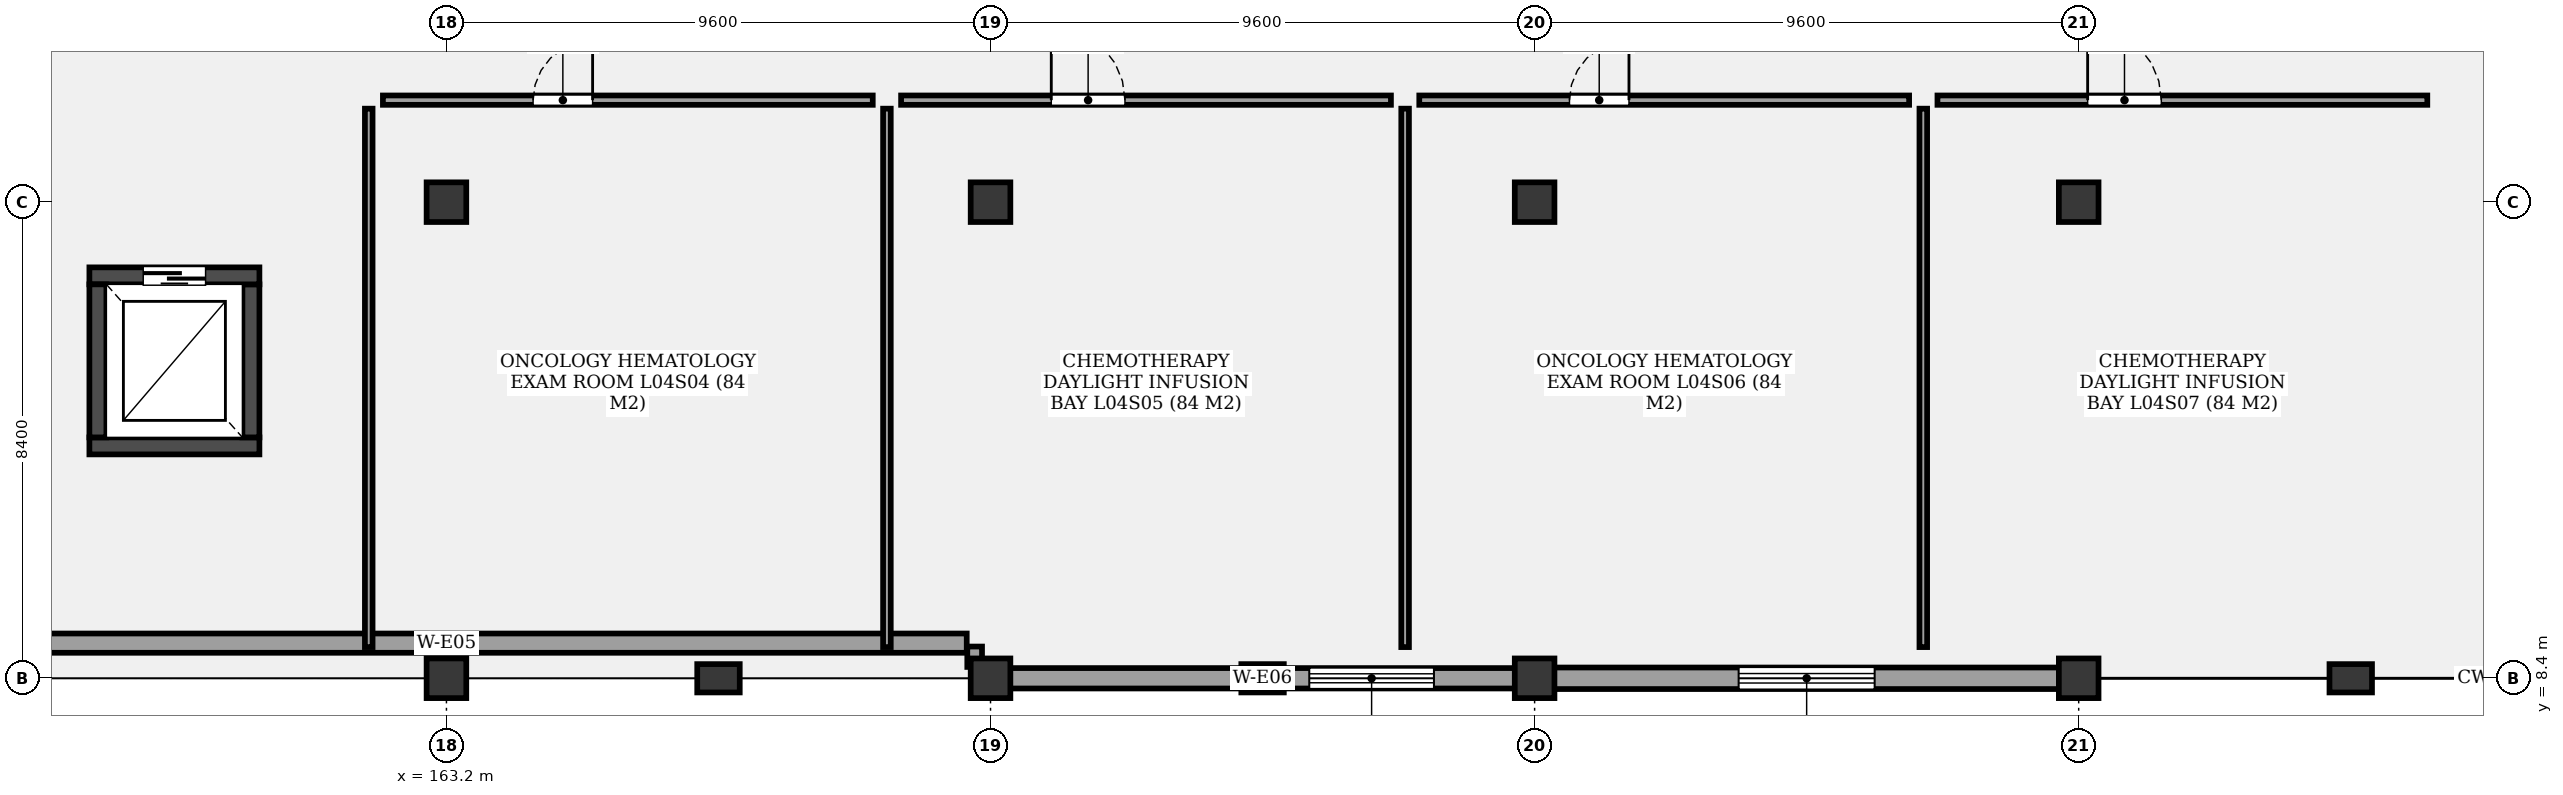
"""IFC4 building model, lengths in metres.
Left out: names, types, materials, properties, quantities, classifications, styles, units other than length and angle.
Written with IfcOpenShell. Run it as: python <this file> out.ifc"""

import sys

from ifc_helpers import new_model, si_unit, direction, frame, frame_2d, origin, origin_2d, place, context, subcontext, project, spatial, rectangle, extrude, element, fill, save


model = new_model("IFC4")
c1 = context("Model", 3, precision=1e-05, world=origin(), true_north=direction((0.0, 1.0)))
c2 = subcontext(c1, "Body", "Model", "MODEL_VIEW")
j1 = project(units=[si_unit("LENGTHUNIT", "METRE"), si_unit("PLANEANGLEUNIT", "RADIAN")], contexts=[c1])
p1 = place(None, origin())
s1 = spatial("IfcSite", under=j1, at=p1, CompositionType="ELEMENT")
p2 = place(p1, origin())
s2 = spatial("IfcBuilding", under=s1, at=p2, CompositionType="ELEMENT")
p3 = place(p2, frame((0.0, 0.0, 17.8)))
s3 = spatial("IfcBuildingStorey", under=s2, at=p3, CompositionType="ELEMENT", Elevation=17.8)
for number, where, z_axis, x_axis in (
    (1, (163.2, 8.4, 0.0), (0.0, 0.0, 1.0), (1.0, 0.0, 0.0)),
    (2, (163.2, 16.8, 0.0), (0.0, 0.0, 1.0), (1.0, 0.0, 0.0)),
    (3, (172.8, 8.4, 0.0), (0.0, 0.0, 1.0), (1.0, 0.0, 0.0)),
    (4, (172.8, 16.8, 0.0), (0.0, 0.0, 1.0), (1.0, 0.0, 0.0)),
    (5, (182.4, 8.4, 0.0), (0.0, 0.0, 1.0), (1.0, 0.0, 0.0)),
    (6, (182.4, 16.8, 0.0), (0.0, 0.0, 1.0), (1.0, 0.0, 0.0)),
    (7, (192.0, 8.4, 0.0), (0.0, 0.0, 1.0), (1.0, 0.0, 0.0)),
    (8, (192.0, 16.8, 0.0), (0.0, 0.0, 1.0), (1.0, 0.0, 0.0)),
):
    element("IfcColumn", number, at=place(p3, frame(where, z_axis=z_axis, x_axis=x_axis)), inside=s3, PredefinedType="COLUMN", context=c2, shape_type="SweptSolid", body=[
        extrude(rectangle(XDim=0.7, YDim=0.7, at=origin_2d()), origin(), (0.0, 0.0, 1.0), 4.2),
    ])
for number, where, z_axis, x_axis in (
    (9, (168.0, 8.4, 0.0), (0.0, 0.0, 1.0), (1.0, 0.0, 0.0)),
    (10, (177.6, 8.4, 0.0), (0.0, 0.0, 1.0), (1.0, 0.0, 0.0)),
    (11, (196.8, 8.4, 0.0), (0.0, 0.0, 1.0), (1.0, 0.0, 0.0)),
):
    element("IfcColumn", number, at=place(p3, frame(where, z_axis=z_axis, x_axis=x_axis)), inside=s3, PredefinedType="PILASTER", context=c2, shape_type="SweptSolid", body=[
        extrude(rectangle(XDim=0.75, YDim=0.5, at=origin_2d()), origin(), (0.0, 0.0, 1.0), 4.2),
    ])
p4 = place(p3, frame((156.9, 12.5, 0.0), z_axis=(0.0, 0.0, 1.0), x_axis=(1.0, 0.0, 0.0)))
e12 = element("IfcWall", 12, at=p4, inside=s3, PredefinedType="SHEAR", context=c2, shape_type="SweptSolid", body=[
    extrude(rectangle(XDim=3.0, YDim=0.3, at=frame_2d((1.5, 0.0))), origin(), (0.0, 0.0, 1.0), 4.2),
])
p5 = place(p3, frame((159.75, 12.65, 0.0), z_axis=(0.0, 0.0, 1.0), x_axis=(0.0, 1.0, 0.0)))
e13 = element("IfcWall", 13, at=p5, inside=s3, PredefinedType="SHEAR", context=c2, shape_type="SweptSolid", body=[
    extrude(rectangle(XDim=2.7, YDim=0.3, at=frame_2d((1.35, 0.0))), origin(), (0.0, 0.0, 1.0), 4.2),
])
p6 = place(p3, frame((159.9, 15.5, 0.0), z_axis=(0.0, 0.0, 1.0), x_axis=(-1.0, 0.0, 0.0)))
e14 = element("IfcWall", 14, at=p6, inside=s3, PredefinedType="SHEAR", context=c2, shape_type="SweptSolid", body=[
    extrude(rectangle(XDim=3.0, YDim=0.3, at=frame_2d((1.5, 0.0))), origin(), (0.0, 0.0, 1.0), 4.2),
])
p7 = place(p6, frame((0.95, 0.0, 0.0)))
e15 = element("IfcOpeningElement", 15, at=p7, cuts=e14, PredefinedType="OPENING", context=c2, shape_type="SweptSolid", body=[
    extrude(rectangle(XDim=1.1, YDim=2.2, at=frame_2d((0.55, 1.1))), frame((0.0, 0.16, 0.0), z_axis=(0.0, -1.0, 0.0), x_axis=(1.0, 0.0, 0.0)), (0.0, 0.0, 1.0), 0.32),
])
p8 = place(p3, frame((157.05, 15.35, 0.0), z_axis=(0.0, 0.0, 1.0), x_axis=(0.0, -1.0, 0.0)))
e16 = element("IfcWall", 16, at=p8, inside=s3, PredefinedType="SHEAR", context=c2, shape_type="SweptSolid", body=[
    extrude(rectangle(XDim=2.7, YDim=0.3, at=frame_2d((1.35, 0.0))), origin(), (0.0, 0.0, 1.0), 4.2),
])
p9 = place(p3, frame((172.52, 8.6, 0.0), z_axis=(0.0, 0.0, 1.0), x_axis=(0.0, 1.0, 0.0)))
e17 = element("IfcWall", 17, at=p9, inside=s3, PredefinedType="SOLIDWALL", context=c2, shape_type="SweptSolid", body=[
    extrude(rectangle(XDim=0.36, YDim=0.26, at=frame_2d((0.18, 0.0))), origin(), (0.0, 0.0, 1.0), 3.39),
])
p10 = place(p3, frame((172.38, 9.02, 0.0), z_axis=(0.0, 0.0, 1.0), x_axis=(-1.0, 0.0, 0.0)))
e18 = element("IfcWall", 18, at=p10, inside=s3, PredefinedType="SOLIDWALL", context=c2, shape_type="SweptSolid", body=[
    extrude(rectangle(XDim=18.36, YDim=0.34, at=frame_2d((9.18, 0.0))), origin(), (0.0, 0.0, 1.0), 3.39),
])
p11 = place(p3, frame((182.4, 8.4, 0.0), z_axis=(0.0, 0.0, 1.0), x_axis=(-1.0, 0.0, 0.0)))
e19 = element("IfcWall", 19, at=p11, inside=s3, PredefinedType="SOLIDWALL", context=c2, shape_type="SweptSolid", body=[
    extrude(rectangle(XDim=9.6, YDim=0.36, at=frame_2d((4.8, 0.0))), origin(), (0.0, 0.0, 1.0), 3.39),
])
p12 = place(p11, frame((1.776, 0.0, 0.85)))
e20 = element("IfcOpeningElement", 20, at=p12, cuts=e19, PredefinedType="OPENING", context=c2, shape_type="SweptSolid", body=[
    extrude(rectangle(XDim=2.2, YDim=1.4, at=frame_2d((1.1, 0.7))), frame((0.0, 0.19, 0.0), z_axis=(0.0, -1.0, 0.0), x_axis=(1.0, 0.0, 0.0)), (0.0, 0.0, 1.0), 0.38),
])
p13 = place(p3, frame((192.0, 8.4, 0.0), z_axis=(0.0, 0.0, 1.0), x_axis=(-1.0, 0.0, 0.0)))
e21 = element("IfcWall", 21, at=p13, inside=s3, PredefinedType="SOLIDWALL", context=c2, shape_type="SweptSolid", body=[
    extrude(rectangle(XDim=9.6, YDim=0.38, at=frame_2d((4.8, 0.0))), origin(), (0.0, 0.0, 1.0), 3.39),
])
p14 = place(p13, frame((3.6, 0.0, 0.85)))
e22 = element("IfcOpeningElement", 22, at=p14, cuts=e21, PredefinedType="OPENING", context=c2, shape_type="SweptSolid", body=[
    extrude(rectangle(XDim=2.4, YDim=1.4, at=frame_2d((1.2, 0.7))), frame((0.0, 0.2, 0.0), z_axis=(0.0, -1.0, 0.0), x_axis=(1.0, 0.0, 0.0)), (0.0, 0.0, 1.0), 0.4),
])
p15 = place(p3, frame((162.079, 18.6, 0.0), z_axis=(0.0, 0.0, 1.0), x_axis=(1.0, 0.0, 0.0)))
e23 = element("IfcWall", 23, at=p15, inside=s3, PredefinedType="PARTITIONING", context=c2, shape_type="SweptSolid", body=[
    extrude(rectangle(XDim=8.643, YDim=0.165, at=frame_2d((4.321, 0.0))), origin(), (0.0, 0.0, 1.0), 3.3),
])
p16 = place(p15, frame((2.65, 0.0, 0.0)))
e24 = element("IfcOpeningElement", 24, at=p16, cuts=e23, PredefinedType="OPENING", context=c2, shape_type="SweptSolid", body=[
    extrude(rectangle(XDim=1.05, YDim=2.1, at=frame_2d((0.525, 1.05))), frame((0.0, 0.093, 0.0), z_axis=(0.0, -1.0, 0.0), x_axis=(1.0, 0.0, 0.0)), (0.0, 0.0, 1.0), 0.185),
])
p17 = place(p3, frame((161.829, 8.95, 0.0), z_axis=(0.0, 0.0, 1.0), x_axis=(0.0, 1.0, 0.0)))
e25 = element("IfcWall", 25, at=p17, inside=s3, PredefinedType="PARTITIONING", context=c2, shape_type="SweptSolid", body=[
    extrude(rectangle(XDim=9.5, YDim=0.135, at=frame_2d((4.75, 0.0))), origin(), (0.0, 0.0, 1.0), 3.3),
])
p18 = place(p3, frame((171.222, 18.6, 0.0), z_axis=(0.0, 0.0, 1.0), x_axis=(1.0, 0.0, 0.0)))
e26 = element("IfcWall", 26, at=p18, inside=s3, PredefinedType="PARTITIONING", context=c2, shape_type="SweptSolid", body=[
    extrude(rectangle(XDim=8.643, YDim=0.165, at=frame_2d((4.322, 0.0))), origin(), (0.0, 0.0, 1.0), 3.3),
])
p19 = place(p18, frame((2.65, 0.0, 0.0)))
e27 = element("IfcOpeningElement", 27, at=p19, cuts=e26, PredefinedType="OPENING", context=c2, shape_type="SweptSolid", body=[
    extrude(rectangle(XDim=1.3, YDim=2.2, at=frame_2d((0.65, 1.1))), frame((0.0, 0.093, 0.0), z_axis=(0.0, -1.0, 0.0), x_axis=(1.0, 0.0, 0.0)), (0.0, 0.0, 1.0), 0.185),
])
p20 = place(p3, frame((170.972, 8.95, 0.0), z_axis=(0.0, 0.0, 1.0), x_axis=(0.0, 1.0, 0.0)))
e28 = element("IfcWall", 28, at=p20, inside=s3, PredefinedType="PARTITIONING", context=c2, shape_type="SweptSolid", body=[
    extrude(rectangle(XDim=9.5, YDim=0.135, at=frame_2d((4.75, 0.0))), origin(), (0.0, 0.0, 1.0), 3.3),
])
p21 = place(p3, frame((180.365, 18.6, 0.0), z_axis=(0.0, 0.0, 1.0), x_axis=(1.0, 0.0, 0.0)))
e29 = element("IfcWall", 29, at=p21, inside=s3, PredefinedType="PARTITIONING", context=c2, shape_type="SweptSolid", body=[
    extrude(rectangle(XDim=8.643, YDim=0.165, at=frame_2d((4.322, 0.0))), origin(), (0.0, 0.0, 1.0), 3.3),
])
p22 = place(p21, frame((2.65, 0.0, 0.0)))
e30 = element("IfcOpeningElement", 30, at=p22, cuts=e29, PredefinedType="OPENING", context=c2, shape_type="SweptSolid", body=[
    extrude(rectangle(XDim=1.05, YDim=2.1, at=frame_2d((0.525, 1.05))), frame((0.0, 0.093, 0.0), z_axis=(0.0, -1.0, 0.0), x_axis=(1.0, 0.0, 0.0)), (0.0, 0.0, 1.0), 0.185),
])
p23 = place(p3, frame((180.115, 8.95, 0.0), z_axis=(0.0, 0.0, 1.0), x_axis=(0.0, 1.0, 0.0)))
e31 = element("IfcWall", 31, at=p23, inside=s3, PredefinedType="PARTITIONING", context=c2, shape_type="SweptSolid", body=[
    extrude(rectangle(XDim=9.5, YDim=0.135, at=frame_2d((4.75, 0.0))), origin(), (0.0, 0.0, 1.0), 3.3),
])
p24 = place(p3, frame((189.508, 18.6, 0.0), z_axis=(0.0, 0.0, 1.0), x_axis=(1.0, 0.0, 0.0)))
e32 = element("IfcWall", 32, at=p24, inside=s3, PredefinedType="PARTITIONING", context=c2, shape_type="SweptSolid", body=[
    extrude(rectangle(XDim=8.643, YDim=0.165, at=frame_2d((4.321, 0.0))), origin(), (0.0, 0.0, 1.0), 3.3),
])
p25 = place(p24, frame((2.65, 0.0, 0.0)))
e33 = element("IfcOpeningElement", 33, at=p25, cuts=e32, PredefinedType="OPENING", context=c2, shape_type="SweptSolid", body=[
    extrude(rectangle(XDim=1.3, YDim=2.2, at=frame_2d((0.65, 1.1))), frame((0.0, 0.093, 0.0), z_axis=(0.0, -1.0, 0.0), x_axis=(1.0, 0.0, 0.0)), (0.0, 0.0, 1.0), 0.185),
])
p26 = place(p3, frame((189.258, 8.95, 0.0), z_axis=(0.0, 0.0, 1.0), x_axis=(0.0, 1.0, 0.0)))
e34 = element("IfcWall", 34, at=p26, inside=s3, PredefinedType="PARTITIONING", context=c2, shape_type="SweptSolid", body=[
    extrude(rectangle(XDim=9.5, YDim=0.135, at=frame_2d((4.75, 0.0))), origin(), (0.0, 0.0, 1.0), 3.3),
])
p27 = place(p7, origin())
e35 = element("IfcDoor", 35, at=p27, inside=s3, OperationType="SLIDING_TO_RIGHT", PredefinedType="DOOR", context=c2, shape_type="SweptSolid", body=[
    extrude(rectangle(XDim=1.1, YDim=2.2, at=frame_2d((0.55, 1.1))), frame((0.0, 0.025, 0.0), z_axis=(0.0, -1.0, 0.0), x_axis=(1.0, 0.0, 0.0)), (0.0, 0.0, 1.0), 0.05),
])
fill(e15, e35)
p28 = place(p12, origin())
e36 = element("IfcWindow", 36, at=p28, inside=s3, PartitioningType="SINGLE_PANEL", PredefinedType="WINDOW", context=c2, shape_type="SweptSolid", body=[
    extrude(rectangle(XDim=2.2, YDim=1.4, at=frame_2d((1.1, 0.7))), frame((0.0, 0.03, 0.0), z_axis=(0.0, -1.0, 0.0), x_axis=(1.0, 0.0, 0.0)), (0.0, 0.0, 1.0), 0.06),
])
fill(e20, e36)
p29 = place(p14, origin())
e37 = element("IfcWindow", 37, at=p29, inside=s3, PartitioningType="SINGLE_PANEL", PredefinedType="WINDOW", context=c2, shape_type="SweptSolid", body=[
    extrude(rectangle(XDim=2.4, YDim=1.4, at=frame_2d((1.2, 0.7))), frame((0.0, 0.03, 0.0), z_axis=(0.0, -1.0, 0.0), x_axis=(1.0, 0.0, 0.0)), (0.0, 0.0, 1.0), 0.06),
])
fill(e22, e37)
p30 = place(p16, origin())
e38 = element("IfcDoor", 38, at=p30, inside=s3, OperationType="SINGLE_SWING_RIGHT", PredefinedType="DOOR", context=c2, shape_type="SweptSolid", body=[
    extrude(rectangle(XDim=1.05, YDim=2.1, at=frame_2d((0.525, 1.05))), frame((0.0, 0.025, 0.0), z_axis=(0.0, -1.0, 0.0), x_axis=(1.0, 0.0, 0.0)), (0.0, 0.0, 1.0), 0.05),
])
fill(e24, e38)
p31 = place(p19, origin())
e39 = element("IfcDoor", 39, at=p31, inside=s3, OperationType="SINGLE_SWING_LEFT", PredefinedType="DOOR", context=c2, shape_type="SweptSolid", body=[
    extrude(rectangle(XDim=1.3, YDim=2.2, at=frame_2d((0.65, 1.1))), frame((0.0, 0.025, 0.0), z_axis=(0.0, -1.0, 0.0), x_axis=(1.0, 0.0, 0.0)), (0.0, 0.0, 1.0), 0.05),
])
fill(e27, e39)
p32 = place(p22, origin())
e40 = element("IfcDoor", 40, at=p32, inside=s3, OperationType="SINGLE_SWING_RIGHT", PredefinedType="DOOR", context=c2, shape_type="SweptSolid", body=[
    extrude(rectangle(XDim=1.05, YDim=2.1, at=frame_2d((0.525, 1.05))), frame((0.0, 0.025, 0.0), z_axis=(0.0, -1.0, 0.0), x_axis=(1.0, 0.0, 0.0)), (0.0, 0.0, 1.0), 0.05),
])
fill(e30, e40)
p33 = place(p25, origin())
e41 = element("IfcDoor", 41, at=p33, inside=s3, OperationType="SINGLE_SWING_LEFT", PredefinedType="DOOR", context=c2, shape_type="SweptSolid", body=[
    extrude(rectangle(XDim=1.3, YDim=2.2, at=frame_2d((0.65, 1.1))), frame((0.0, 0.025, 0.0), z_axis=(0.0, -1.0, 0.0), x_axis=(1.0, 0.0, 0.0)), (0.0, 0.0, 1.0), 0.05),
])
fill(e33, e41)
save(model, sys.argv[1])
